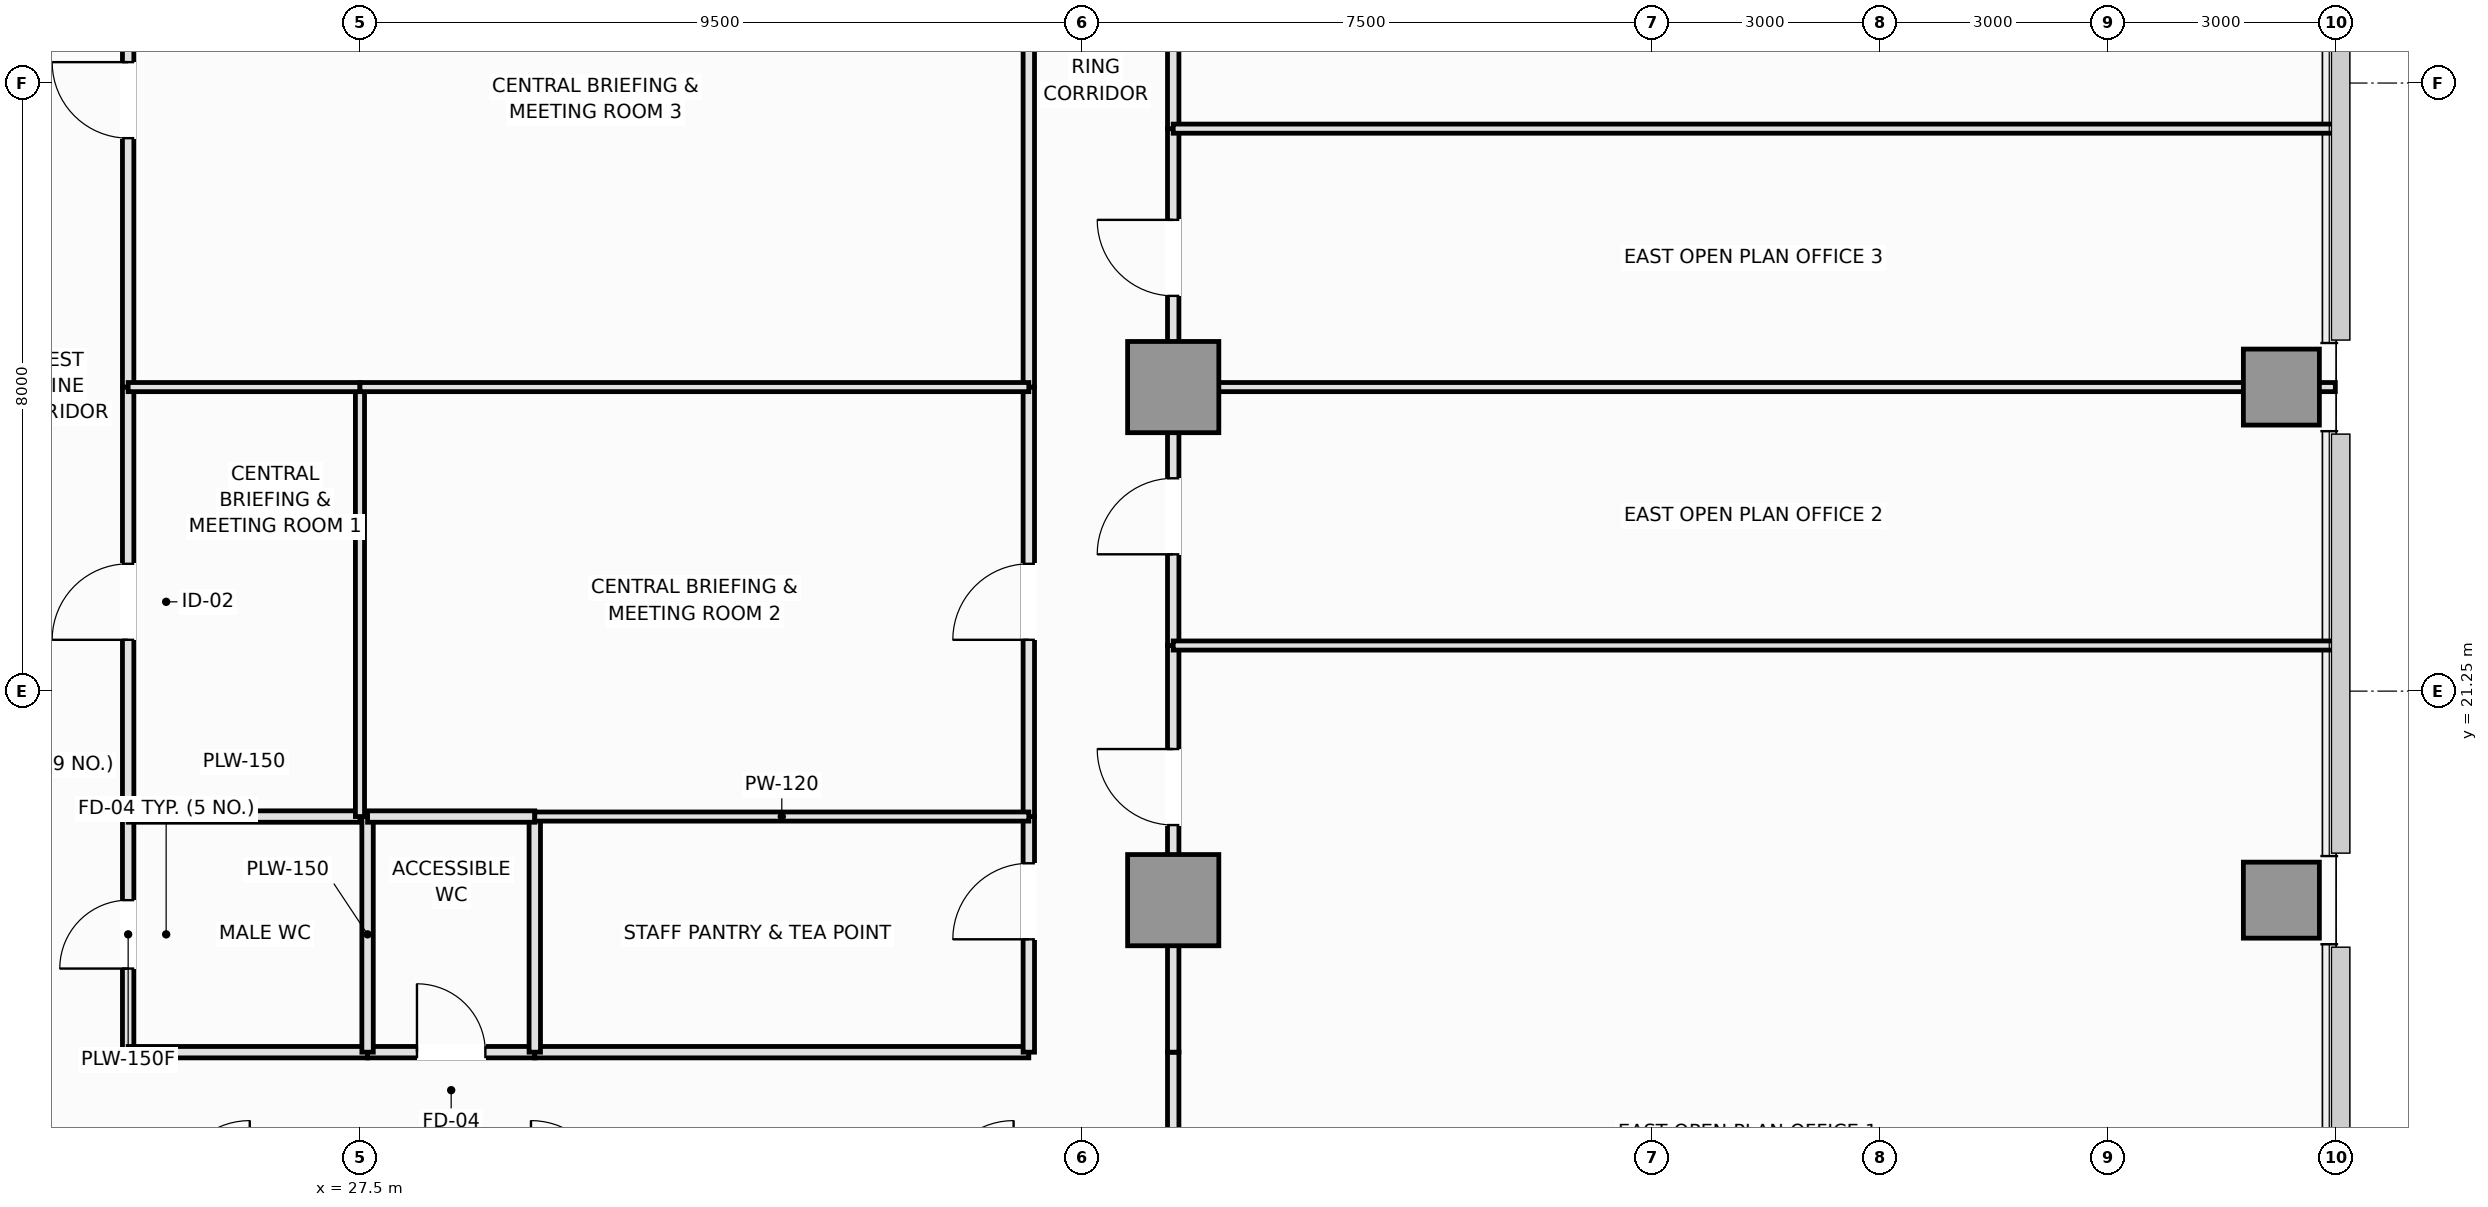
"""IFC4 building model, lengths in metres.
Left out: names, types, materials, properties, quantities, classifications, styles, units other than length and angle.
Written with IfcOpenShell. Run it as: python <this file> out.ifc"""

import sys

from ifc_helpers import new_model, si_unit, direction, frame, frame_2d, origin, origin_2d, place, context, subcontext, project, spatial, rectangle, extrude, element, fill, save


model = new_model("IFC4")
c1 = context("Model", 3, precision=1e-05, world=origin(), true_north=direction((0.0, 1.0)))
c2 = subcontext(c1, "Body", "Model", "MODEL_VIEW")
j1 = project(units=[si_unit("LENGTHUNIT", "METRE"), si_unit("PLANEANGLEUNIT", "RADIAN")], contexts=[c1])
p1 = place(None, origin())
s1 = spatial("IfcSite", under=j1, at=p1, CompositionType="ELEMENT")
p2 = place(p1, origin())
s2 = spatial("IfcBuilding", under=s1, at=p2, CompositionType="ELEMENT")
p3 = place(p2, frame((0.0, 0.0, 61.1)))
s3 = spatial("IfcBuildingStorey", under=s2, at=p3, CompositionType="ELEMENT", Elevation=61.1)
for number, where, z_axis, x_axis in (
    (1, (38.2, 18.5, 0.0), (0.0, 0.0, 1.0), (1.0, 0.0, 0.0)),
    (2, (38.2, 25.25, 0.0), (0.0, 0.0, 1.0), (1.0, 0.0, 0.0)),
):
    element("IfcColumn", number, at=place(p3, frame(where, z_axis=z_axis, x_axis=x_axis)), inside=s3, PredefinedType="COLUMN", context=c2, shape_type="SweptSolid", body=[
        extrude(rectangle(XDim=1.2, YDim=1.2, at=origin_2d()), origin(), (0.0, 0.0, 1.0), 3.55),
    ])
for number, where, z_axis, x_axis in (
    (3, (52.78, 18.5, 0.0), (0.0, 0.0, 1.0), (1.0, 0.0, 0.0)),
    (4, (52.78, 25.25, 0.0), (0.0, 0.0, 1.0), (1.0, 0.0, 0.0)),
):
    element("IfcColumn", number, at=place(p3, frame(where, z_axis=z_axis, x_axis=x_axis)), inside=s3, PredefinedType="COLUMN", context=c2, shape_type="SweptSolid", body=[
        extrude(rectangle(XDim=1.0, YDim=1.0, at=origin_2d()), origin(), (0.0, 0.0, 1.0), 3.55),
    ])
p4 = place(p3, frame((24.45, 16.5, 0.0), z_axis=(0.0, 0.0, 1.0), x_axis=(0.0, 1.0, 0.0)))
e5 = element("IfcWall", 5, at=p4, inside=s3, PredefinedType="PLUMBINGWALL", context=c2, shape_type="SweptSolid", body=[
    extrude(rectangle(XDim=3.1, YDim=0.15, at=frame_2d((1.55, 0.0))), origin(), (0.0, 0.0, 1.0), 3.37),
])
p5 = place(p4, frame((1.1, 0.0, 0.0)))
e6 = element("IfcOpeningElement", 6, at=p5, cuts=e5, PredefinedType="OPENING", context=c2, shape_type="SweptSolid", body=[
    extrude(rectangle(XDim=0.9, YDim=2.1, at=frame_2d((0.45, 1.05))), frame((0.0, 0.085, 0.0), z_axis=(0.0, -1.0, 0.0), x_axis=(1.0, 0.0, 0.0)), (0.0, 0.0, 1.0), 0.17),
])
p6 = place(p3, frame((24.45, 19.6, 0.0), z_axis=(0.0, 0.0, 1.0), x_axis=(0.0, 1.0, 0.0)))
e7 = element("IfcWall", 7, at=p6, inside=s3, PredefinedType="PARTITIONING", context=c2, shape_type="SweptSolid", body=[
    extrude(rectangle(XDim=5.65, YDim=0.15, at=frame_2d((2.825, 0.0))), origin(), (0.0, 0.0, 1.0), 3.37),
])
p7 = place(p6, frame((2.325, 0.0, 0.0)))
e8 = element("IfcOpeningElement", 8, at=p7, cuts=e7, PredefinedType="OPENING", context=c2, shape_type="SweptSolid", body=[
    extrude(rectangle(XDim=1.0, YDim=2.15, at=frame_2d((0.5, 1.075))), frame((0.0, 0.085, 0.0), z_axis=(0.0, -1.0, 0.0), x_axis=(1.0, 0.0, 0.0)), (0.0, 0.0, 1.0), 0.17),
])
p8 = place(p3, frame((24.45, 25.25, 0.0), z_axis=(0.0, 0.0, 1.0), x_axis=(0.0, 1.0, 0.0)))
e9 = element("IfcWall", 9, at=p8, inside=s3, PredefinedType="PARTITIONING", context=c2, shape_type="SweptSolid", body=[
    extrude(rectangle(XDim=7.55, YDim=0.15, at=frame_2d((3.775, 0.0))), origin(), (0.0, 0.0, 1.0), 3.37),
])
p9 = place(p8, frame((3.275, 0.0, 0.0)))
e10 = element("IfcOpeningElement", 10, at=p9, cuts=e9, PredefinedType="OPENING", context=c2, shape_type="SweptSolid", body=[
    extrude(rectangle(XDim=1.0, YDim=2.15, at=frame_2d((0.5, 1.075))), frame((0.0, 0.085, 0.0), z_axis=(0.0, -1.0, 0.0), x_axis=(1.0, 0.0, 0.0)), (0.0, 0.0, 1.0), 0.17),
])
p10 = place(p3, frame((24.45, 16.5, 0.0), z_axis=(0.0, 0.0, 1.0), x_axis=(1.0, 0.0, 0.0)))
e11 = element("IfcWall", 11, at=p10, inside=s3, PredefinedType="PLUMBINGWALL", context=c2, shape_type="SweptSolid", body=[
    extrude(rectangle(XDim=3.15, YDim=0.15, at=frame_2d((1.575, 0.0))), origin(), (0.0, 0.0, 1.0), 3.37),
])
p11 = place(p3, frame((27.6, 16.5, 0.0), z_axis=(0.0, 0.0, 1.0), x_axis=(1.0, 0.0, 0.0)))
e12 = element("IfcWall", 12, at=p11, inside=s3, PredefinedType="PLUMBINGWALL", context=c2, shape_type="SweptSolid", body=[
    extrude(rectangle(XDim=2.2, YDim=0.15, at=frame_2d((1.1, 0.0))), origin(), (0.0, 0.0, 1.0), 3.37),
])
p12 = place(p11, frame((0.65, 0.0, 0.0)))
e13 = element("IfcOpeningElement", 13, at=p12, cuts=e12, PredefinedType="OPENING", context=c2, shape_type="SweptSolid", body=[
    extrude(rectangle(XDim=0.9, YDim=2.1, at=frame_2d((0.45, 1.05))), frame((0.0, 0.085, 0.0), z_axis=(0.0, -1.0, 0.0), x_axis=(1.0, 0.0, 0.0)), (0.0, 0.0, 1.0), 0.17),
])
p13 = place(p3, frame((29.8, 16.5, 0.0), z_axis=(0.0, 0.0, 1.0), x_axis=(1.0, 0.0, 0.0)))
e14 = element("IfcWall", 14, at=p13, inside=s3, PredefinedType="PARTITIONING", context=c2, shape_type="SweptSolid", body=[
    extrude(rectangle(XDim=6.5, YDim=0.15, at=frame_2d((3.25, 0.0))), origin(), (0.0, 0.0, 1.0), 3.37),
])
p14 = place(p3, frame((38.2, 14.6, 0.0), z_axis=(0.0, 0.0, 1.0), x_axis=(0.0, 1.0, 0.0)))
e15 = element("IfcWall", 15, at=p14, inside=s3, PredefinedType="PARTITIONING", context=c2, shape_type="SweptSolid", body=[
    extrude(rectangle(XDim=1.9, YDim=0.15, at=frame_2d((0.95, 0.0))), origin(), (0.0, 0.0, 1.0), 2.82),
])
p15 = place(p3, frame((36.3, 16.5, 0.0), z_axis=(0.0, 0.0, 1.0), x_axis=(0.0, 1.0, 0.0)))
e16 = element("IfcWall", 16, at=p15, inside=s3, PredefinedType="PARTITIONING", context=c2, shape_type="SweptSolid", body=[
    extrude(rectangle(XDim=3.1, YDim=0.15, at=frame_2d((1.55, 0.0))), origin(), (0.0, 0.0, 1.0), 3.37),
])
p16 = place(p15, frame((1.485, 0.0, 0.0)))
e17 = element("IfcOpeningElement", 17, at=p16, cuts=e16, PredefinedType="OPENING", context=c2, shape_type="SweptSolid", body=[
    extrude(rectangle(XDim=1.0, YDim=2.15, at=frame_2d((0.5, 1.075))), frame((0.0, 0.085, 0.0), z_axis=(0.0, -1.0, 0.0), x_axis=(1.0, 0.0, 0.0)), (0.0, 0.0, 1.0), 0.17),
])
p17 = place(p3, frame((36.3, 19.6, 0.0), z_axis=(0.0, 0.0, 1.0), x_axis=(0.0, 1.0, 0.0)))
e18 = element("IfcWall", 18, at=p17, inside=s3, PredefinedType="PARTITIONING", context=c2, shape_type="SweptSolid", body=[
    extrude(rectangle(XDim=5.65, YDim=0.15, at=frame_2d((2.825, 0.0))), origin(), (0.0, 0.0, 1.0), 3.37),
])
p18 = place(p17, frame((2.325, 0.0, 0.0)))
e19 = element("IfcOpeningElement", 19, at=p18, cuts=e18, PredefinedType="OPENING", context=c2, shape_type="SweptSolid", body=[
    extrude(rectangle(XDim=1.0, YDim=2.15, at=frame_2d((0.5, 1.075))), frame((0.0, 0.085, 0.0), z_axis=(0.0, -1.0, 0.0), x_axis=(1.0, 0.0, 0.0)), (0.0, 0.0, 1.0), 0.17),
])
p19 = place(p3, frame((36.3, 25.25, 0.0), z_axis=(0.0, 0.0, 1.0), x_axis=(0.0, 1.0, 0.0)))
e20 = element("IfcWall", 20, at=p19, inside=s3, PredefinedType="PARTITIONING", context=c2, shape_type="SweptSolid", body=[
    extrude(rectangle(XDim=7.55, YDim=0.15, at=frame_2d((3.775, 0.0))), origin(), (0.0, 0.0, 1.0), 3.37),
])
p20 = place(p3, frame((38.2, 16.5, 0.0), z_axis=(0.0, 0.0, 1.0), x_axis=(0.0, 1.0, 0.0)))
e21 = element("IfcWall", 21, at=p20, inside=s3, PredefinedType="PARTITIONING", context=c2, shape_type="SweptSolid", body=[
    extrude(rectangle(XDim=5.35, YDim=0.15, at=frame_2d((2.675, 0.0))), origin(), (0.0, 0.0, 1.0), 2.82),
])
p21 = place(p20, frame((2.988, 0.0, 0.0)))
e22 = element("IfcOpeningElement", 22, at=p21, cuts=e21, PredefinedType="OPENING", context=c2, shape_type="SweptSolid", body=[
    extrude(rectangle(XDim=1.0, YDim=2.15, at=frame_2d((0.5, 1.075))), frame((0.0, 0.085, 0.0), z_axis=(0.0, -1.0, 0.0), x_axis=(1.0, 0.0, 0.0)), (0.0, 0.0, 1.0), 0.17),
])
p22 = place(p3, frame((38.2, 21.85, 0.0), z_axis=(0.0, 0.0, 1.0), x_axis=(0.0, 1.0, 0.0)))
e23 = element("IfcWall", 23, at=p22, inside=s3, PredefinedType="PARTITIONING", context=c2, shape_type="SweptSolid", body=[
    extrude(rectangle(XDim=3.4, YDim=0.15, at=frame_2d((1.7, 0.0))), origin(), (0.0, 0.0, 1.0), 2.82),
])
p23 = place(p22, frame((1.2, 0.0, 0.0)))
e24 = element("IfcOpeningElement", 24, at=p23, cuts=e23, PredefinedType="OPENING", context=c2, shape_type="SweptSolid", body=[
    extrude(rectangle(XDim=1.0, YDim=2.15, at=frame_2d((0.5, 1.075))), frame((0.0, 0.085, 0.0), z_axis=(0.0, -1.0, 0.0), x_axis=(1.0, 0.0, 0.0)), (0.0, 0.0, 1.0), 0.17),
])
p24 = place(p3, frame((38.2, 25.25, 0.0), z_axis=(0.0, 0.0, 1.0), x_axis=(0.0, 1.0, 0.0)))
e25 = element("IfcWall", 25, at=p24, inside=s3, PredefinedType="PARTITIONING", context=c2, shape_type="SweptSolid", body=[
    extrude(rectangle(XDim=3.4, YDim=0.15, at=frame_2d((1.7, 0.0))), origin(), (0.0, 0.0, 1.0), 2.82),
])
p25 = place(p24, frame((1.2, 0.0, 0.0)))
e26 = element("IfcOpeningElement", 26, at=p25, cuts=e25, PredefinedType="OPENING", context=c2, shape_type="SweptSolid", body=[
    extrude(rectangle(XDim=1.0, YDim=2.15, at=frame_2d((0.5, 1.075))), frame((0.0, 0.085, 0.0), z_axis=(0.0, -1.0, 0.0), x_axis=(1.0, 0.0, 0.0)), (0.0, 0.0, 1.0), 0.17),
])
p26 = place(p3, frame((38.2, 28.65, 0.0), z_axis=(0.0, 0.0, 1.0), x_axis=(0.0, 1.0, 0.0)))
e27 = element("IfcWall", 27, at=p26, inside=s3, PredefinedType="PARTITIONING", context=c2, shape_type="SweptSolid", body=[
    extrude(rectangle(XDim=7.25, YDim=0.15, at=frame_2d((3.625, 0.0))), origin(), (0.0, 0.0, 1.0), 2.82),
])
p27 = place(p26, frame((4.303, 0.0, 0.0)))
e28 = element("IfcOpeningElement", 28, at=p27, cuts=e27, PredefinedType="OPENING", context=c2, shape_type="SweptSolid", body=[
    extrude(rectangle(XDim=1.0, YDim=2.15, at=frame_2d((0.5, 1.075))), frame((0.0, 0.085, 0.0), z_axis=(0.0, -1.0, 0.0), x_axis=(1.0, 0.0, 0.0)), (0.0, 0.0, 1.0), 0.17),
])
p28 = place(p3, frame((27.6, 16.5, 0.0), z_axis=(0.0, 0.0, 1.0), x_axis=(0.0, 1.0, 0.0)))
e29 = element("IfcWall", 29, at=p28, inside=s3, PredefinedType="PLUMBINGWALL", context=c2, shape_type="SweptSolid", body=[
    extrude(rectangle(XDim=3.1, YDim=0.15, at=frame_2d((1.55, 0.0))), origin(), (0.0, 0.0, 1.0), 3.37),
])
p29 = place(p3, frame((24.45, 19.6, 0.0), z_axis=(0.0, 0.0, 1.0), x_axis=(1.0, 0.0, 0.0)))
e30 = element("IfcWall", 30, at=p29, inside=s3, PredefinedType="PLUMBINGWALL", context=c2, shape_type="SweptSolid", body=[
    extrude(rectangle(XDim=3.05, YDim=0.15, at=frame_2d((1.525, 0.0))), origin(), (0.0, 0.0, 1.0), 3.37),
])
p30 = place(p3, frame((29.8, 16.5, 0.0), z_axis=(0.0, 0.0, 1.0), x_axis=(0.0, 1.0, 0.0)))
e31 = element("IfcWall", 31, at=p30, inside=s3, PredefinedType="PLUMBINGWALL", context=c2, shape_type="SweptSolid", body=[
    extrude(rectangle(XDim=3.1, YDim=0.15, at=frame_2d((1.55, 0.0))), origin(), (0.0, 0.0, 1.0), 3.37),
])
p31 = place(p3, frame((27.6, 19.6, 0.0), z_axis=(0.0, 0.0, 1.0), x_axis=(1.0, 0.0, 0.0)))
e32 = element("IfcWall", 32, at=p31, inside=s3, PredefinedType="PLUMBINGWALL", context=c2, shape_type="SweptSolid", body=[
    extrude(rectangle(XDim=2.2, YDim=0.15, at=frame_2d((1.1, 0.0))), origin(), (0.0, 0.0, 1.0), 3.37),
])
p32 = place(p3, frame((29.8, 19.6, 0.0), z_axis=(0.0, 0.0, 1.0), x_axis=(1.0, 0.0, 0.0)))
e33 = element("IfcWall", 33, at=p32, inside=s3, PredefinedType="PARTITIONING", context=c2, shape_type="SweptSolid", body=[
    extrude(rectangle(XDim=6.5, YDim=0.12, at=frame_2d((3.25, 0.0))), origin(), (0.0, 0.0, 1.0), 3.37),
])
p33 = place(p3, frame((27.5, 19.6, 0.0), z_axis=(0.0, 0.0, 1.0), x_axis=(0.0, 1.0, 0.0)))
e34 = element("IfcWall", 34, at=p33, inside=s3, PredefinedType="PARTITIONING", context=c2, shape_type="SweptSolid", body=[
    extrude(rectangle(XDim=5.65, YDim=0.12, at=frame_2d((2.825, 0.0))), origin(), (0.0, 0.0, 1.0), 3.37),
])
p34 = place(p3, frame((24.45, 25.25, 0.0), z_axis=(0.0, 0.0, 1.0), x_axis=(1.0, 0.0, 0.0)))
e35 = element("IfcWall", 35, at=p34, inside=s3, PredefinedType="PARTITIONING", context=c2, shape_type="SweptSolid", body=[
    extrude(rectangle(XDim=3.05, YDim=0.12, at=frame_2d((1.525, 0.0))), origin(), (0.0, 0.0, 1.0), 2.72),
])
p35 = place(p3, frame((27.5, 25.25, 0.0), z_axis=(0.0, 0.0, 1.0), x_axis=(1.0, 0.0, 0.0)))
e36 = element("IfcWall", 36, at=p35, inside=s3, PredefinedType="PARTITIONING", context=c2, shape_type="SweptSolid", body=[
    extrude(rectangle(XDim=8.8, YDim=0.12, at=frame_2d((4.4, 0.0))), origin(), (0.0, 0.0, 1.0), 2.72),
])
p36 = place(p3, frame((38.2, 21.85, 0.0), z_axis=(0.0, 0.0, 1.0), x_axis=(1.0, 0.0, 0.0)))
e37 = element("IfcWall", 37, at=p36, inside=s3, PredefinedType="PARTITIONING", context=c2, shape_type="SweptSolid", body=[
    extrude(rectangle(XDim=15.29, YDim=0.12, at=frame_2d((7.645, 0.0))), origin(), (0.0, 0.0, 1.0), 3.37),
])
p37 = place(p3, frame((38.2, 25.25, 0.0), z_axis=(0.0, 0.0, 1.0), x_axis=(1.0, 0.0, 0.0)))
e38 = element("IfcWall", 38, at=p37, inside=s3, PredefinedType="PARTITIONING", context=c2, shape_type="SweptSolid", body=[
    extrude(rectangle(XDim=15.29, YDim=0.12, at=frame_2d((7.645, 0.0))), origin(), (0.0, 0.0, 1.0), 2.72),
])
p38 = place(p3, frame((38.2, 28.65, 0.0), z_axis=(0.0, 0.0, 1.0), x_axis=(1.0, 0.0, 0.0)))
e39 = element("IfcWall", 39, at=p38, inside=s3, PredefinedType="PARTITIONING", context=c2, shape_type="SweptSolid", body=[
    extrude(rectangle(XDim=15.29, YDim=0.12, at=frame_2d((7.645, 0.0))), origin(), (0.0, 0.0, 1.0), 3.37),
])
p39 = place(p5, origin())
e40 = element("IfcDoor", 40, at=p39, inside=s3, OperationType="SINGLE_SWING_LEFT", PredefinedType="DOOR", context=c2, shape_type="SweptSolid", body=[
    extrude(rectangle(XDim=0.9, YDim=2.1, at=frame_2d((0.45, 1.05))), frame((0.0, 0.025, 0.0), z_axis=(0.0, -1.0, 0.0), x_axis=(1.0, 0.0, 0.0)), (0.0, 0.0, 1.0), 0.05),
])
fill(e6, e40)
p40 = place(p7, origin())
e41 = element("IfcDoor", 41, at=p40, inside=s3, OperationType="SINGLE_SWING_LEFT", PredefinedType="DOOR", context=c2, shape_type="SweptSolid", body=[
    extrude(rectangle(XDim=1.0, YDim=2.15, at=frame_2d((0.5, 1.075))), frame((0.0, 0.025, 0.0), z_axis=(0.0, -1.0, 0.0), x_axis=(1.0, 0.0, 0.0)), (0.0, 0.0, 1.0), 0.05),
])
fill(e8, e41)
p41 = place(p9, origin())
e42 = element("IfcDoor", 42, at=p41, inside=s3, OperationType="SINGLE_SWING_RIGHT", PredefinedType="DOOR", context=c2, shape_type="SweptSolid", body=[
    extrude(rectangle(XDim=1.0, YDim=2.15, at=frame_2d((0.5, 1.075))), frame((0.0, 0.025, 0.0), z_axis=(0.0, -1.0, 0.0), x_axis=(1.0, 0.0, 0.0)), (0.0, 0.0, 1.0), 0.05),
])
fill(e10, e42)
p42 = place(p12, origin())
e43 = element("IfcDoor", 43, at=p42, inside=s3, OperationType="SINGLE_SWING_LEFT", PredefinedType="DOOR", context=c2, shape_type="SweptSolid", body=[
    extrude(rectangle(XDim=0.9, YDim=2.1, at=frame_2d((0.45, 1.05))), frame((0.0, 0.025, 0.0), z_axis=(0.0, -1.0, 0.0), x_axis=(1.0, 0.0, 0.0)), (0.0, 0.0, 1.0), 0.05),
])
fill(e13, e43)
p43 = place(p16, origin())
e44 = element("IfcDoor", 44, at=p43, inside=s3, OperationType="SINGLE_SWING_LEFT", PredefinedType="DOOR", context=c2, shape_type="SweptSolid", body=[
    extrude(rectangle(XDim=1.0, YDim=2.15, at=frame_2d((0.5, 1.075))), frame((0.0, 0.025, 0.0), z_axis=(0.0, -1.0, 0.0), x_axis=(1.0, 0.0, 0.0)), (0.0, 0.0, 1.0), 0.05),
])
fill(e17, e44)
p44 = place(p18, origin())
e45 = element("IfcDoor", 45, at=p44, inside=s3, OperationType="SINGLE_SWING_LEFT", PredefinedType="DOOR", context=c2, shape_type="SweptSolid", body=[
    extrude(rectangle(XDim=1.0, YDim=2.15, at=frame_2d((0.5, 1.075))), frame((0.0, 0.025, 0.0), z_axis=(0.0, -1.0, 0.0), x_axis=(1.0, 0.0, 0.0)), (0.0, 0.0, 1.0), 0.05),
])
fill(e19, e45)
p45 = place(p21, origin())
e46 = element("IfcDoor", 46, at=p45, inside=s3, OperationType="SINGLE_SWING_RIGHT", PredefinedType="DOOR", context=c2, shape_type="SweptSolid", body=[
    extrude(rectangle(XDim=1.0, YDim=2.15, at=frame_2d((0.5, 1.075))), frame((0.0, 0.025, 0.0), z_axis=(0.0, -1.0, 0.0), x_axis=(1.0, 0.0, 0.0)), (0.0, 0.0, 1.0), 0.05),
])
fill(e22, e46)
p46 = place(p23, origin())
e47 = element("IfcDoor", 47, at=p46, inside=s3, OperationType="SINGLE_SWING_LEFT", PredefinedType="DOOR", context=c2, shape_type="SweptSolid", body=[
    extrude(rectangle(XDim=1.0, YDim=2.15, at=frame_2d((0.5, 1.075))), frame((0.0, 0.025, 0.0), z_axis=(0.0, -1.0, 0.0), x_axis=(1.0, 0.0, 0.0)), (0.0, 0.0, 1.0), 0.05),
])
fill(e24, e47)
p47 = place(p25, origin())
e48 = element("IfcDoor", 48, at=p47, inside=s3, OperationType="SINGLE_SWING_RIGHT", PredefinedType="DOOR", context=c2, shape_type="SweptSolid", body=[
    extrude(rectangle(XDim=1.0, YDim=2.15, at=frame_2d((0.5, 1.075))), frame((0.0, 0.025, 0.0), z_axis=(0.0, -1.0, 0.0), x_axis=(1.0, 0.0, 0.0)), (0.0, 0.0, 1.0), 0.05),
])
fill(e26, e48)
save(model, sys.argv[1])
